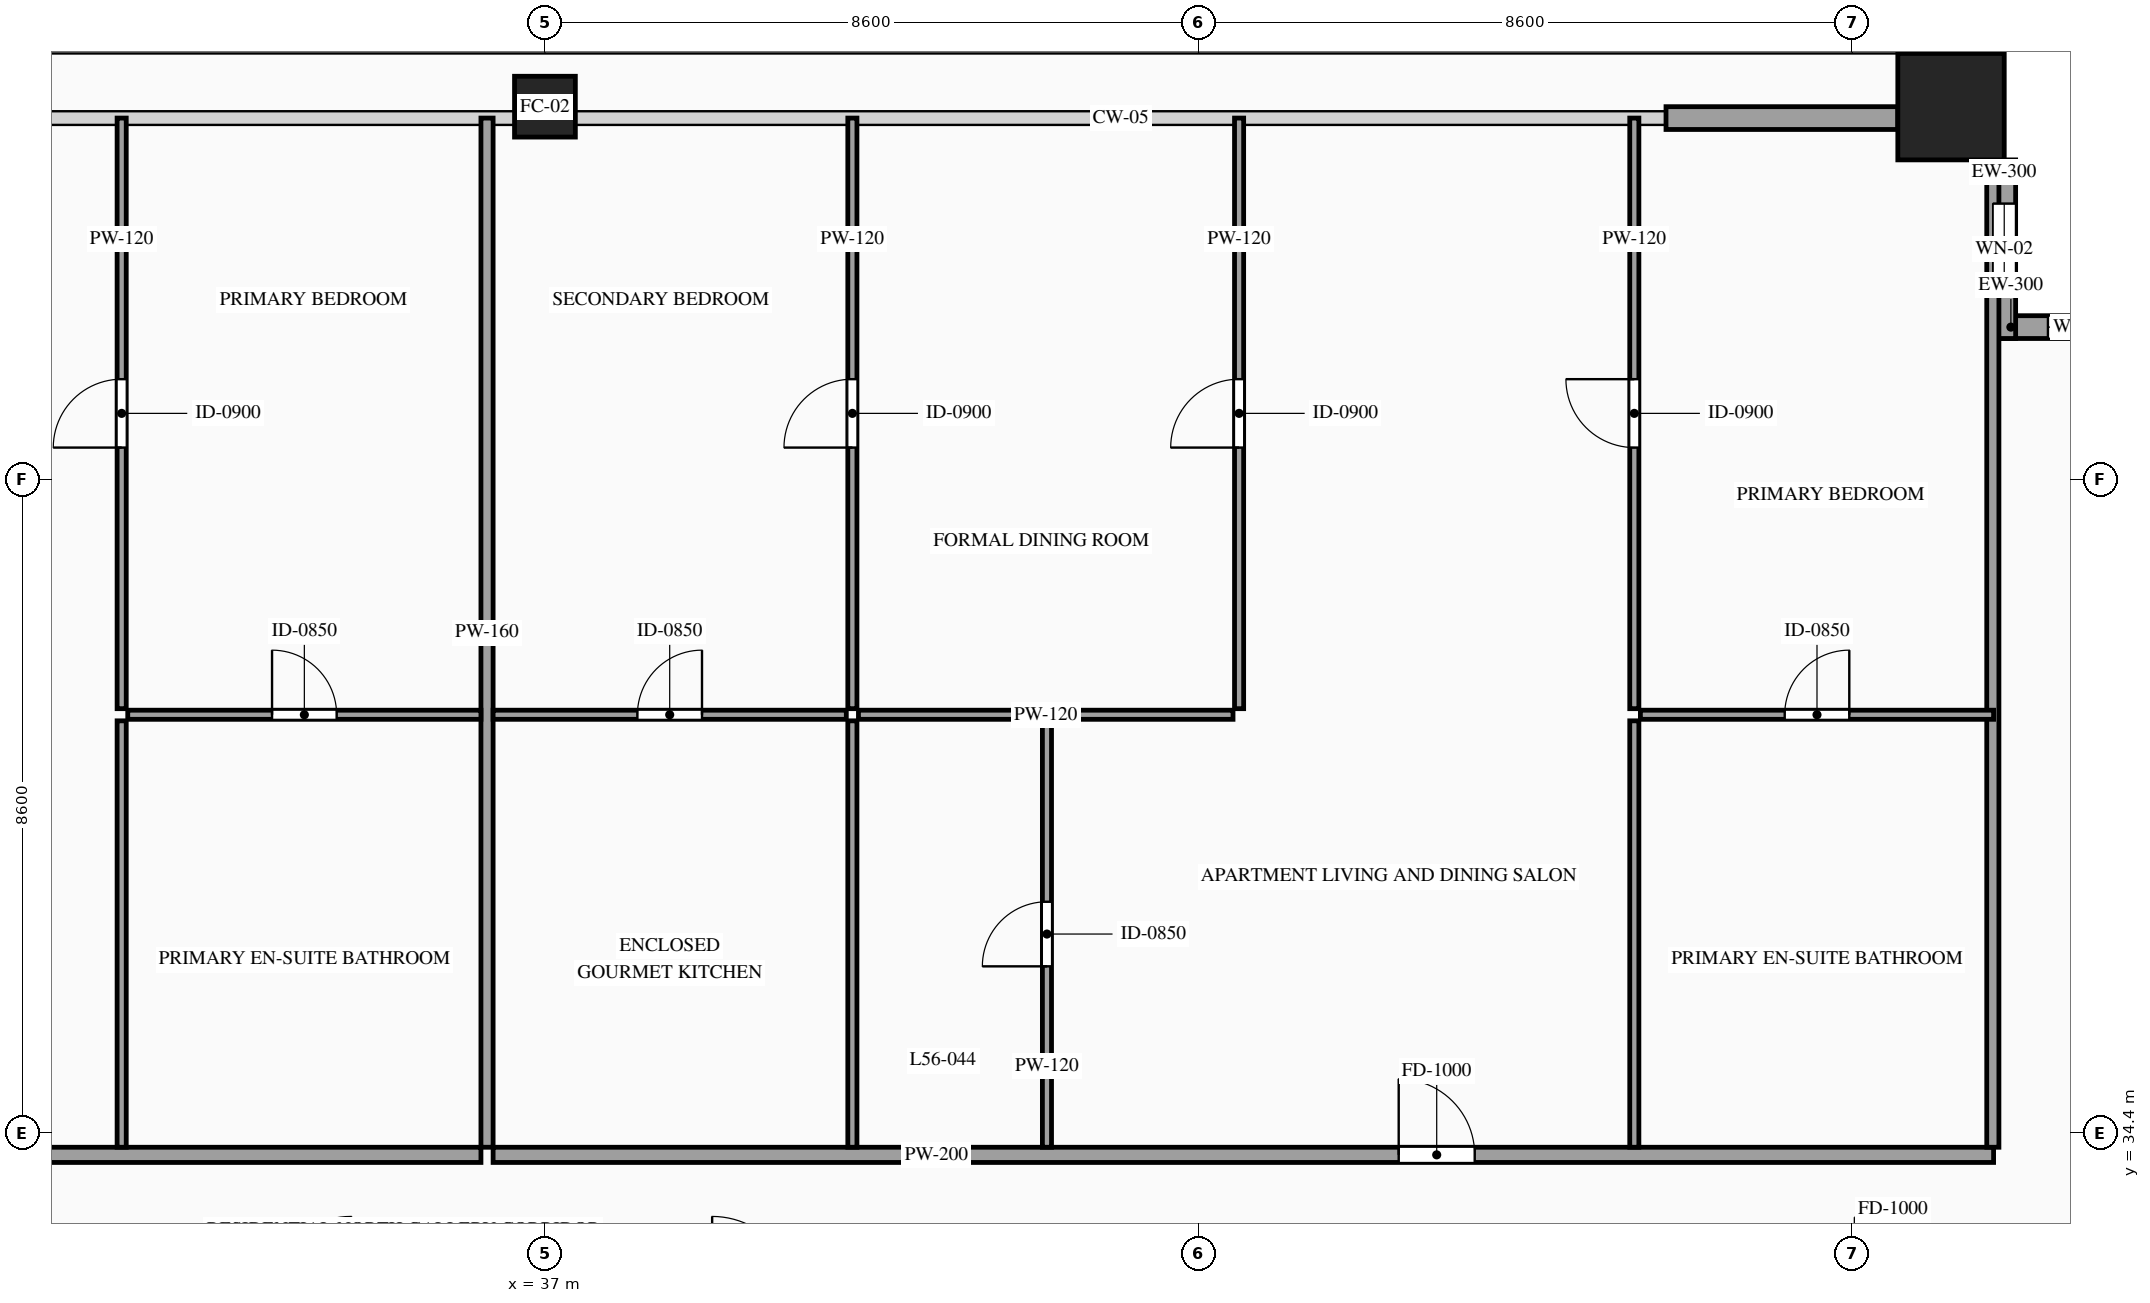
"""IFC4 building model, lengths in metres.
Left out: names, types, materials, properties, quantities, classifications, styles, units other than length and angle.
Written with IfcOpenShell. Run it as: python <this file> out.ifc"""

import sys

from ifc_helpers import new_model, si_unit, direction, frame, frame_2d, origin, origin_2d, place, context, subcontext, project, spatial, rectangle, hollow_rectangle, extrude, source, transform, mapped, element, fill, save


model = new_model("IFC4")
c1 = context("Model", 3, precision=1e-05, world=origin(), true_north=direction((0.0, 1.0)))
c2 = subcontext(c1, "Body", "Model", "MODEL_VIEW")
j1 = project(units=[si_unit("LENGTHUNIT", "METRE"), si_unit("PLANEANGLEUNIT", "RADIAN")], contexts=[c1])
p1 = place(None, origin())
s1 = spatial("IfcSite", under=j1, at=p1, CompositionType="ELEMENT")
p2 = place(p1, origin())
s2 = spatial("IfcBuilding", under=s1, at=p2, CompositionType="ELEMENT")
p3 = place(p2, frame((0.0, 0.0, 212.5)))
s3 = spatial("IfcBuildingStorey", under=s2, at=p3, CompositionType="ELEMENT", Elevation=212.5)
m1 = source(origin(), c2, "Body", "SweptSolid", [
    extrude(hollow_rectangle(XDim=0.8, YDim=0.8, WallThickness=0.036, at=origin_2d()), origin(), (0.0, 0.0, 1.0), 3.5),
])
p4 = place(p3, frame((37.0, 47.9, 0.0), z_axis=(0.0, 0.0, 1.0), x_axis=(1.0, 0.0, 0.0)))
e1 = element("IfcColumn", 1, at=p4, inside=s3, PredefinedType="COLUMN", context=c2, shape_type="MappedRepresentation", body=[
    mapped(m1, transform((0.0, 0.0, 0.0), scale=1.0)),
])
m2 = source(origin(), c2, "Body", "SweptSolid", [
    extrude(hollow_rectangle(XDim=1.4, YDim=1.4, WallThickness=0.06, at=origin_2d()), origin(), (0.0, 0.0, 1.0), 3.5),
])
p5 = place(p3, frame((55.5, 47.9, 0.0), z_axis=(0.0, 0.0, 1.0), x_axis=(1.0, 0.0, 0.0)))
e2 = element("IfcColumn", 2, at=p5, inside=s3, PredefinedType="COLUMN", context=c2, shape_type="MappedRepresentation", body=[
    mapped(m2, transform((0.0, 0.0, 0.0), scale=1.0)),
])
p6 = place(p3, frame((58.4, 45.0, 0.0), z_axis=(0.0, 0.0, 1.0), x_axis=(-1.0, 0.0, 0.0)))
e3 = element("IfcWall", 3, at=p6, inside=s3, PredefinedType="SOLIDWALL", context=c2, shape_type="SweptSolid", body=[
    extrude(rectangle(XDim=2.35, YDim=0.3, at=frame_2d((1.175, 0.0))), origin(), (0.0, 0.0, 1.0), 3.28),
])
p7 = place(p6, frame((0.725, 0.0, 0.85)))
e4 = element("IfcOpeningElement", 4, at=p7, cuts=e3, PredefinedType="OPENING", context=c2, shape_type="SweptSolid", body=[
    extrude(rectangle(XDim=0.9, YDim=1.5, at=frame_2d((0.45, 0.75))), frame((0.0, 0.165, 0.0), z_axis=(0.0, -1.0, 0.0), x_axis=(1.0, 0.0, 0.0)), (0.0, 0.0, 1.0), 0.33),
])
p8 = place(p3, frame((56.2, 44.85, 0.0), z_axis=(0.0, 0.0, 1.0), x_axis=(0.0, 1.0, 0.0)))
e5 = element("IfcWall", 5, at=p8, inside=s3, PredefinedType="SOLIDWALL", context=c2, shape_type="SweptSolid", body=[
    extrude(rectangle(XDim=2.35, YDim=0.3, at=frame_2d((1.175, 0.0))), origin(), (0.0, 0.0, 1.0), 3.28),
])
p9 = place(p8, frame((0.575, 0.0, 0.85)))
e6 = element("IfcOpeningElement", 6, at=p9, cuts=e5, PredefinedType="OPENING", context=c2, shape_type="SweptSolid", body=[
    extrude(rectangle(XDim=1.2, YDim=2.1, at=frame_2d((0.6, 1.05))), frame((0.0, 0.165, 0.0), z_axis=(0.0, -1.0, 0.0), x_axis=(1.0, 0.0, 0.0)), (0.0, 0.0, 1.0), 0.33),
])
m3 = source(origin(), c2, "Body", "SweptSolid", [
    extrude(rectangle(XDim=3.05, YDim=0.3, at=frame_2d((1.525, 0.0))), origin(), (0.0, 0.0, 1.0), 2.835),
])
p10 = place(p3, frame((51.75, 47.75, 0.0), z_axis=(0.0, 0.0, 1.0), x_axis=(1.0, 0.0, 0.0)))
e7 = element("IfcWall", 7, at=p10, inside=s3, PredefinedType="SOLIDWALL", context=c2, shape_type="MappedRepresentation", body=[
    mapped(m3, transform((0.0, 0.0, 0.0), scale=1.0)),
])
p11 = place(p3, frame((17.94, 34.11, 0.0), z_axis=(0.0, 0.0, 1.0), x_axis=(1.0, 0.0, 0.0)))
e8 = element("IfcWall", 8, at=p11, inside=s3, PredefinedType="PARTITIONING", context=c2, shape_type="SweptSolid", body=[
    extrude(rectangle(XDim=18.218, YDim=0.2, at=frame_2d((9.109, 0.0))), origin(), (0.0, 0.0, 1.0), 3.28),
])
p12 = place(p11, frame((10.582, 0.0, 0.0)))
e9 = element("IfcOpeningElement", 9, at=p12, cuts=e8, PredefinedType="OPENING", context=c2, shape_type="SweptSolid", body=[
    extrude(rectangle(XDim=1.0, YDim=2.2, at=frame_2d((0.5, 1.1))), frame((0.0, 0.115, 0.0), z_axis=(0.0, -1.0, 0.0), x_axis=(1.0, 0.0, 0.0)), (0.0, 0.0, 1.0), 0.23),
])
m4 = source(origin(), c2, "Body", "SweptSolid", [
    extrude(rectangle(XDim=13.54, YDim=0.16, at=frame_2d((6.77, 0.0))), origin(), (0.0, 0.0, 1.0), 3.28),
])
p13 = place(p3, frame((36.238, 34.21, 0.0), z_axis=(0.0, 0.0, 1.0), x_axis=(0.0, 1.0, 0.0)))
e10 = element("IfcWall", 10, at=p13, inside=s3, PredefinedType="PARTITIONING", context=c2, shape_type="MappedRepresentation", body=[
    mapped(m4, transform((0.0, 0.0, 0.0), scale=1.0)),
])
p14 = place(p3, frame((31.511, 39.9, 0.0), z_axis=(0.0, 0.0, 1.0), x_axis=(1.0, 0.0, 0.0)))
e11 = element("IfcWall", 11, at=p14, inside=s3, PredefinedType="PARTITIONING", context=c2, shape_type="SweptSolid", body=[
    extrude(rectangle(XDim=4.647, YDim=0.12, at=frame_2d((2.323, 0.0))), origin(), (0.0, 0.0, 1.0), 2.875),
])
p15 = place(p14, frame((1.898, 0.0, 0.0)))
e12 = element("IfcOpeningElement", 12, at=p15, cuts=e11, PredefinedType="OPENING", context=c2, shape_type="SweptSolid", body=[
    extrude(rectangle(XDim=0.85, YDim=2.1, at=frame_2d((0.425, 1.05))), frame((0.0, 0.075, 0.0), z_axis=(0.0, -1.0, 0.0), x_axis=(1.0, 0.0, 0.0)), (0.0, 0.0, 1.0), 0.15),
])
m5 = source(origin(), c2, "Body", "SweptSolid", [
    extrude(rectangle(XDim=5.61, YDim=0.12, at=frame_2d((2.805, 0.0))), origin(), (0.0, 0.0, 1.0), 3.28),
])
p16 = place(p3, frame((31.431, 34.21, 0.0), z_axis=(0.0, 0.0, 1.0), x_axis=(0.0, 1.0, 0.0)))
e13 = element("IfcWall", 13, at=p16, inside=s3, PredefinedType="PARTITIONING", context=c2, shape_type="MappedRepresentation", body=[
    mapped(m5, transform((0.0, 0.0, 0.0), scale=1.0)),
])
p17 = place(p3, frame((31.431, 39.98, 0.0), z_axis=(0.0, 0.0, 1.0), x_axis=(0.0, 1.0, 0.0)))
e14 = element("IfcWall", 14, at=p17, inside=s3, PredefinedType="PARTITIONING", context=c2, shape_type="SweptSolid", body=[
    extrude(rectangle(XDim=7.77, YDim=0.12, at=frame_2d((3.885, 0.0))), origin(), (0.0, 0.0, 1.0), 3.28),
])
p18 = place(p17, frame((3.435, 0.0, 0.0)))
e15 = element("IfcOpeningElement", 15, at=p18, cuts=e14, PredefinedType="OPENING", context=c2, shape_type="SweptSolid", body=[
    extrude(rectangle(XDim=0.9, YDim=2.15, at=frame_2d((0.45, 1.075))), frame((0.0, 0.075, 0.0), z_axis=(0.0, -1.0, 0.0), x_axis=(1.0, 0.0, 0.0)), (0.0, 0.0, 1.0), 0.15),
])
p19 = place(p3, frame((36.318, 34.11, 0.0), z_axis=(0.0, 0.0, 1.0), x_axis=(1.0, 0.0, 0.0)))
e16 = element("IfcWall", 16, at=p19, inside=s3, PredefinedType="PARTITIONING", context=c2, shape_type="SweptSolid", body=[
    extrude(rectangle(XDim=19.742, YDim=0.2, at=frame_2d((9.871, 0.0))), origin(), (0.0, 0.0, 1.0), 3.28),
])
p20 = place(p19, frame((11.915, 0.0, 0.0)))
e17 = element("IfcOpeningElement", 17, at=p20, cuts=e16, PredefinedType="OPENING", context=c2, shape_type="SweptSolid", body=[
    extrude(rectangle(XDim=1.0, YDim=2.2, at=frame_2d((0.5, 1.1))), frame((0.0, 0.115, 0.0), z_axis=(0.0, -1.0, 0.0), x_axis=(1.0, 0.0, 0.0)), (0.0, 0.0, 1.0), 0.23),
])
m6 = source(origin(), c2, "Body", "SweptSolid", [
    extrude(rectangle(XDim=13.39, YDim=0.16, at=frame_2d((6.695, 0.0))), origin(), (0.0, 0.0, 1.0), 3.28),
])
p21 = place(p3, frame((56.05, 34.21, 0.0), z_axis=(0.0, 0.0, 1.0), x_axis=(0.0, 1.0, 0.0)))
e18 = element("IfcWall", 18, at=p21, inside=s3, PredefinedType="PARTITIONING", context=c2, shape_type="MappedRepresentation", body=[
    mapped(m6, transform((0.0, 0.0, 0.0), scale=1.0)),
])
p22 = place(p3, frame((36.318, 39.9, 0.0), z_axis=(0.0, 0.0, 1.0), x_axis=(1.0, 0.0, 0.0)))
e19 = element("IfcWall", 19, at=p22, inside=s3, PredefinedType="PARTITIONING", context=c2, shape_type="SweptSolid", body=[
    extrude(rectangle(XDim=4.647, YDim=0.12, at=frame_2d((2.323, 0.0))), origin(), (0.0, 0.0, 1.0), 2.875),
])
p23 = place(p22, frame((1.898, 0.0, 0.0)))
e20 = element("IfcOpeningElement", 20, at=p23, cuts=e19, PredefinedType="OPENING", context=c2, shape_type="SweptSolid", body=[
    extrude(rectangle(XDim=0.85, YDim=2.1, at=frame_2d((0.425, 1.05))), frame((0.0, 0.075, 0.0), z_axis=(0.0, -1.0, 0.0), x_axis=(1.0, 0.0, 0.0)), (0.0, 0.0, 1.0), 0.15),
])
p24 = place(p3, frame((41.045, 34.21, 0.0), z_axis=(0.0, 0.0, 1.0), x_axis=(0.0, 1.0, 0.0)))
e21 = element("IfcWall", 21, at=p24, inside=s3, PredefinedType="PARTITIONING", context=c2, shape_type="MappedRepresentation", body=[
    mapped(m5, transform((0.0, 0.0, 0.0), scale=1.0)),
])
p25 = place(p3, frame((43.605, 34.21, 0.0), z_axis=(0.0, 0.0, 1.0), x_axis=(0.0, 1.0, 0.0)))
e22 = element("IfcWall", 22, at=p25, inside=s3, PredefinedType="PARTITIONING", context=c2, shape_type="SweptSolid", body=[
    extrude(rectangle(XDim=5.61, YDim=0.12, at=frame_2d((2.805, 0.0))), origin(), (0.0, 0.0, 1.0), 3.28),
])
p26 = place(p25, frame((2.38, 0.0, 0.0)))
e23 = element("IfcOpeningElement", 23, at=p26, cuts=e22, PredefinedType="OPENING", context=c2, shape_type="SweptSolid", body=[
    extrude(rectangle(XDim=0.85, YDim=2.1, at=frame_2d((0.425, 1.05))), frame((0.0, 0.075, 0.0), z_axis=(0.0, -1.0, 0.0), x_axis=(1.0, 0.0, 0.0)), (0.0, 0.0, 1.0), 0.15),
])
p27 = place(p3, frame((51.413, 39.9, 0.0), z_axis=(0.0, 0.0, 1.0), x_axis=(1.0, 0.0, 0.0)))
e24 = element("IfcWall", 24, at=p27, inside=s3, PredefinedType="PARTITIONING", context=c2, shape_type="SweptSolid", body=[
    extrude(rectangle(XDim=4.647, YDim=0.12, at=frame_2d((2.323, 0.0))), origin(), (0.0, 0.0, 1.0), 3.28),
])
p28 = place(p27, frame((1.898, 0.0, 0.0)))
e25 = element("IfcOpeningElement", 25, at=p28, cuts=e24, PredefinedType="OPENING", context=c2, shape_type="SweptSolid", body=[
    extrude(rectangle(XDim=0.85, YDim=2.1, at=frame_2d((0.425, 1.05))), frame((0.0, 0.075, 0.0), z_axis=(0.0, -1.0, 0.0), x_axis=(1.0, 0.0, 0.0)), (0.0, 0.0, 1.0), 0.15),
])
p29 = place(p3, frame((51.333, 34.21, 0.0), z_axis=(0.0, 0.0, 1.0), x_axis=(0.0, 1.0, 0.0)))
e26 = element("IfcWall", 26, at=p29, inside=s3, PredefinedType="PARTITIONING", context=c2, shape_type="MappedRepresentation", body=[
    mapped(m5, transform((0.0, 0.0, 0.0), scale=1.0)),
])
p30 = place(p3, frame((41.045, 39.98, 0.0), z_axis=(0.0, 0.0, 1.0), x_axis=(0.0, 1.0, 0.0)))
e27 = element("IfcWall", 27, at=p30, inside=s3, PredefinedType="PARTITIONING", context=c2, shape_type="SweptSolid", body=[
    extrude(rectangle(XDim=7.77, YDim=0.12, at=frame_2d((3.885, 0.0))), origin(), (0.0, 0.0, 1.0), 3.28),
])
p31 = place(p30, frame((3.435, 0.0, 0.0)))
e28 = element("IfcOpeningElement", 28, at=p31, cuts=e27, PredefinedType="OPENING", context=c2, shape_type="SweptSolid", body=[
    extrude(rectangle(XDim=0.9, YDim=2.15, at=frame_2d((0.45, 1.075))), frame((0.0, 0.075, 0.0), z_axis=(0.0, -1.0, 0.0), x_axis=(1.0, 0.0, 0.0)), (0.0, 0.0, 1.0), 0.15),
])
p32 = place(p3, frame((51.333, 39.98, 0.0), z_axis=(0.0, 0.0, 1.0), x_axis=(0.0, 1.0, 0.0)))
e29 = element("IfcWall", 29, at=p32, inside=s3, PredefinedType="PARTITIONING", context=c2, shape_type="SweptSolid", body=[
    extrude(rectangle(XDim=7.77, YDim=0.12, at=frame_2d((3.885, 0.0))), origin(), (0.0, 0.0, 1.0), 3.28),
])
p33 = place(p32, frame((3.435, 0.0, 0.0)))
e30 = element("IfcOpeningElement", 30, at=p33, cuts=e29, PredefinedType="OPENING", context=c2, shape_type="SweptSolid", body=[
    extrude(rectangle(XDim=0.9, YDim=2.15, at=frame_2d((0.45, 1.075))), frame((0.0, 0.075, 0.0), z_axis=(0.0, -1.0, 0.0), x_axis=(1.0, 0.0, 0.0)), (0.0, 0.0, 1.0), 0.15),
])
m7 = source(origin(), c2, "Body", "SweptSolid", [
    extrude(rectangle(XDim=4.928, YDim=0.12, at=frame_2d((2.464, 0.0))), origin(), (0.0, 0.0, 1.0), 2.875),
])
p34 = place(p3, frame((41.125, 39.9, 0.0), z_axis=(0.0, 0.0, 1.0), x_axis=(1.0, 0.0, 0.0)))
e31 = element("IfcWall", 31, at=p34, inside=s3, PredefinedType="PARTITIONING", context=c2, shape_type="MappedRepresentation", body=[
    mapped(m7, transform((0.0, 0.0, 0.0), scale=1.0)),
])
p35 = place(p3, frame((46.133, 39.98, 0.0), z_axis=(0.0, 0.0, 1.0), x_axis=(0.0, 1.0, 0.0)))
e32 = element("IfcWall", 32, at=p35, inside=s3, PredefinedType="PARTITIONING", context=c2, shape_type="SweptSolid", body=[
    extrude(rectangle(XDim=7.77, YDim=0.12, at=frame_2d((3.885, 0.0))), origin(), (0.0, 0.0, 1.0), 3.28),
])
p36 = place(p35, frame((3.435, 0.0, 0.0)))
e33 = element("IfcOpeningElement", 33, at=p36, cuts=e32, PredefinedType="OPENING", context=c2, shape_type="SweptSolid", body=[
    extrude(rectangle(XDim=0.9, YDim=2.15, at=frame_2d((0.45, 1.075))), frame((0.0, 0.075, 0.0), z_axis=(0.0, -1.0, 0.0), x_axis=(1.0, 0.0, 0.0)), (0.0, 0.0, 1.0), 0.15),
])
m8 = source(origin(), c2, "Body", "SweptSolid", [
    extrude(rectangle(XDim=0.9, YDim=1.5, at=frame_2d((0.45, 0.75))), frame((0.0, 0.03, 0.0), z_axis=(0.0, -1.0, 0.0), x_axis=(1.0, 0.0, 0.0)), (0.0, 0.0, 1.0), 0.06),
])
p37 = place(p7, origin())
e34 = element("IfcWindow", 34, at=p37, inside=s3, PartitioningType="SINGLE_PANEL", PredefinedType="WINDOW", context=c2, shape_type="MappedRepresentation", body=[
    mapped(m8, transform((0.0, 0.0, 0.0), scale=1.0)),
])
fill(e4, e34)
m9 = source(origin(), c2, "Body", "SweptSolid", [
    extrude(rectangle(XDim=1.2, YDim=2.1, at=frame_2d((0.6, 1.05))), frame((0.0, 0.03, 0.0), z_axis=(0.0, -1.0, 0.0), x_axis=(1.0, 0.0, 0.0)), (0.0, 0.0, 1.0), 0.06),
])
p38 = place(p9, origin())
e35 = element("IfcWindow", 35, at=p38, inside=s3, PartitioningType="SINGLE_PANEL", PredefinedType="WINDOW", context=c2, shape_type="MappedRepresentation", body=[
    mapped(m9, transform((0.0, 0.0, 0.0), scale=1.0)),
])
fill(e6, e35)
m10 = source(origin(), c2, "Body", "SweptSolid", [
    extrude(rectangle(XDim=0.85, YDim=2.1, at=frame_2d((0.425, 1.05))), frame((0.0, 0.025, 0.0), z_axis=(0.0, -1.0, 0.0), x_axis=(1.0, 0.0, 0.0)), (0.0, 0.0, 1.0), 0.05),
])
p39 = place(p15, origin())
e36 = element("IfcDoor", 36, at=p39, inside=s3, OperationType="SINGLE_SWING_LEFT", PredefinedType="DOOR", context=c2, shape_type="MappedRepresentation", body=[
    mapped(m10, transform((0.0, 0.0, 0.0), scale=1.0)),
])
fill(e12, e36)
m11 = source(origin(), c2, "Body", "SweptSolid", [
    extrude(rectangle(XDim=0.9, YDim=2.15, at=frame_2d((0.45, 1.075))), frame((0.0, 0.025, 0.0), z_axis=(0.0, -1.0, 0.0), x_axis=(1.0, 0.0, 0.0)), (0.0, 0.0, 1.0), 0.05),
])
p40 = place(p18, origin())
e37 = element("IfcDoor", 37, at=p40, inside=s3, OperationType="SINGLE_SWING_LEFT", PredefinedType="DOOR", context=c2, shape_type="MappedRepresentation", body=[
    mapped(m11, transform((0.0, 0.0, 0.0), scale=1.0)),
])
fill(e15, e37)
m12 = source(origin(), c2, "Body", "SweptSolid", [
    extrude(rectangle(XDim=1.0, YDim=2.2, at=frame_2d((0.5, 1.1))), frame((0.0, 0.025, 0.0), z_axis=(0.0, -1.0, 0.0), x_axis=(1.0, 0.0, 0.0)), (0.0, 0.0, 1.0), 0.05),
])
p41 = place(p20, origin())
e38 = element("IfcDoor", 38, at=p41, inside=s3, OperationType="SINGLE_SWING_LEFT", PredefinedType="DOOR", context=c2, shape_type="MappedRepresentation", body=[
    mapped(m12, transform((0.0, 0.0, 0.0), scale=1.0)),
])
fill(e17, e38)
p42 = place(p23, origin())
e39 = element("IfcDoor", 39, at=p42, inside=s3, OperationType="SINGLE_SWING_RIGHT", PredefinedType="DOOR", context=c2, shape_type="MappedRepresentation", body=[
    mapped(m10, transform((0.0, 0.0, 0.0), scale=1.0)),
])
fill(e20, e39)
p43 = place(p26, origin())
e40 = element("IfcDoor", 40, at=p43, inside=s3, OperationType="SINGLE_SWING_LEFT", PredefinedType="DOOR", context=c2, shape_type="MappedRepresentation", body=[
    mapped(m10, transform((0.0, 0.0, 0.0), scale=1.0)),
])
fill(e23, e40)
p44 = place(p28, origin())
e41 = element("IfcDoor", 41, at=p44, inside=s3, OperationType="SINGLE_SWING_RIGHT", PredefinedType="DOOR", context=c2, shape_type="MappedRepresentation", body=[
    mapped(m10, transform((0.0, 0.0, 0.0), scale=1.0)),
])
fill(e25, e41)
p45 = place(p31, origin())
e42 = element("IfcDoor", 42, at=p45, inside=s3, OperationType="SINGLE_SWING_LEFT", PredefinedType="DOOR", context=c2, shape_type="MappedRepresentation", body=[
    mapped(m11, transform((0.0, 0.0, 0.0), scale=1.0)),
])
fill(e28, e42)
p46 = place(p33, origin())
e43 = element("IfcDoor", 43, at=p46, inside=s3, OperationType="SINGLE_SWING_RIGHT", PredefinedType="DOOR", context=c2, shape_type="MappedRepresentation", body=[
    mapped(m11, transform((0.0, 0.0, 0.0), scale=1.0)),
])
fill(e30, e43)
p47 = place(p36, origin())
e44 = element("IfcDoor", 44, at=p47, inside=s3, OperationType="SINGLE_SWING_LEFT", PredefinedType="DOOR", context=c2, shape_type="MappedRepresentation", body=[
    mapped(m11, transform((0.0, 0.0, 0.0), scale=1.0)),
])
fill(e33, e44)
save(model, sys.argv[1])
